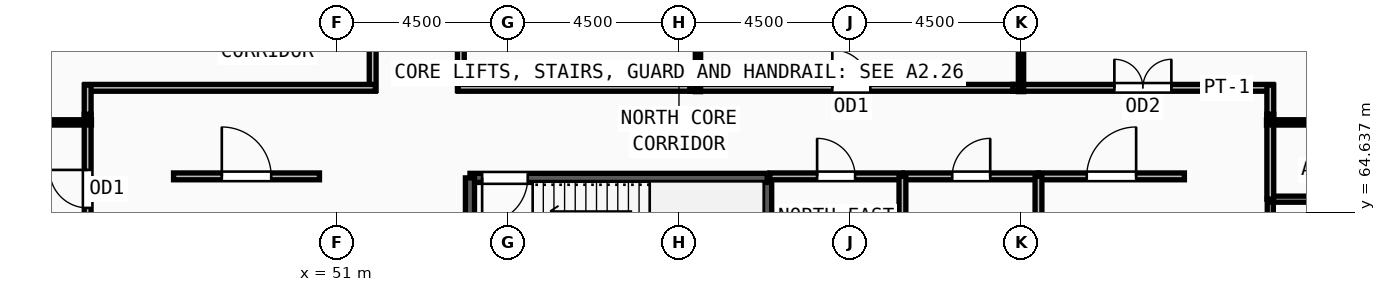
"""IFC4 building model, lengths in metres.
Left out: names, types, materials, properties, quantities, classifications, styles, units other than length and angle.
Written with IfcOpenShell. Run it as: python <this file> out.ifc"""

import sys

from ifc_helpers import new_model, si_unit, direction, frame, frame_2d, origin, place, context, subcontext, project, spatial, rectangle, extrude, source, transform, mapped, element, fill, save


model = new_model("IFC4")
c1 = context("Model", 3, precision=1e-05, world=origin(), true_north=direction((0.0, 1.0)))
c2 = subcontext(c1, "Body", "Model", "MODEL_VIEW")
j1 = project(units=[si_unit("LENGTHUNIT", "METRE"), si_unit("PLANEANGLEUNIT", "RADIAN")], contexts=[c1])
p1 = place(None, origin())
s1 = spatial("IfcSite", under=j1, at=p1, CompositionType="ELEMENT")
p2 = place(p1, origin())
s2 = spatial("IfcBuilding", under=s1, at=p2, CompositionType="ELEMENT")
p3 = place(p2, frame((0.0, 0.0, 297.75)))
s3 = spatial("IfcBuildingStorey", under=s2, at=p3, CompositionType="ELEMENT", Elevation=297.75)
p4 = place(p3, frame((62.32, 62.1, 0.0), z_axis=(0.0, 0.0, 1.0), x_axis=(0.0, 1.0, 0.0)))
e1 = element("IfcWall", 1, at=p4, inside=s3, PredefinedType="SOLIDWALL", context=c2, shape_type="SweptSolid", body=[
    extrude(rectangle(XDim=3.44, YDim=0.24, at=frame_2d((1.72, 0.0))), origin(), (0.0, 0.0, 1.0), 3.57),
])
p5 = place(p3, frame((62.32, 65.54, 0.0), z_axis=(0.0, 0.0, 1.0), x_axis=(-1.0, 0.0, 0.0)))
e2 = element("IfcWall", 2, at=p5, inside=s3, PredefinedType="SOLIDWALL", context=c2, shape_type="SweptSolid", body=[
    extrude(rectangle(XDim=7.82, YDim=0.24, at=frame_2d((3.91, 0.0))), origin(), (0.0, 0.0, 1.0), 3.57),
])
m1 = source(origin(), c2, "Body", "SweptSolid", [
    extrude(rectangle(XDim=1.2, YDim=2.2, at=frame_2d((0.6, 1.1))), frame((0.0, 0.13, 0.0), z_axis=(0.0, -1.0, 0.0), x_axis=(1.0, 0.0, 0.0)), (0.0, 0.0, 1.0), 0.26),
])
p6 = place(p5, frame((6.3, 0.0, 0.0)))
e3 = element("IfcOpeningElement", 3, at=p6, cuts=e2, PredefinedType="OPENING", context=c2, shape_type="MappedRepresentation", body=[
    mapped(m1, transform((0.0, 0.0, 0.0), x_axis=(1.0, 0.0, 0.0), y_axis=(0.0, 1.0, 0.0), z_axis=(0.0, 0.0, 1.0), scale=1.0)),
])
p7 = place(p3, frame((54.5, 65.54, 0.0), z_axis=(0.0, 0.0, 1.0), x_axis=(0.0, -1.0, 0.0)))
e4 = element("IfcWall", 4, at=p7, inside=s3, PredefinedType="SOLIDWALL", context=c2, shape_type="SweptSolid", body=[
    extrude(rectangle(XDim=3.44, YDim=0.24, at=frame_2d((1.72, 0.0))), origin(), (0.0, 0.0, 1.0), 3.57),
])
p8 = place(p3, frame((75.56, 62.24, 0.0), z_axis=(0.0, 0.0, 1.0), x_axis=(0.0, 1.0, 0.0)))
e5 = element("IfcWall", 5, at=p8, inside=s3, PredefinedType="PARTITIONING", context=c2, shape_type="SweptSolid", body=[
    extrude(rectangle(XDim=2.74, YDim=0.16, at=frame_2d((1.37, 0.0))), origin(), (0.0, 0.0, 1.0), 3.57),
])
m2 = source(origin(), c2, "Body", "SweptSolid", [
    extrude(rectangle(XDim=1.05, YDim=2.15, at=frame_2d((0.525, 1.075))), frame((0.0, 0.09, 0.0), z_axis=(0.0, -1.0, 0.0), x_axis=(1.0, 0.0, 0.0)), (0.0, 0.0, 1.0), 0.18),
])
p9 = place(p8, frame((0.845, 0.0, 0.0)))
e6 = element("IfcOpeningElement", 6, at=p9, cuts=e5, PredefinedType="OPENING", context=c2, shape_type="MappedRepresentation", body=[
    mapped(m2, transform((0.0, 0.0, 0.0), x_axis=(1.0, 0.0, 0.0), y_axis=(0.0, 1.0, 0.0), z_axis=(0.0, 0.0, 1.0), scale=1.0)),
])
p10 = place(p3, frame((62.39, 65.58, 0.0), z_axis=(0.0, 0.0, 1.0), x_axis=(1.0, 0.0, 0.0)))
e7 = element("IfcWall", 7, at=p10, inside=s3, PredefinedType="PARTITIONING", context=c2, shape_type="SweptSolid", body=[
    extrude(rectangle(XDim=3.49, YDim=0.18, at=frame_2d((1.745, 0.0))), origin(), (0.0, 0.0, 1.0), 3.57),
])
m3 = source(origin(), c2, "Body", "SweptSolid", [
    extrude(rectangle(XDim=1.0, YDim=2.2, at=frame_2d((0.5, 1.1))), frame((0.0, 0.1, 0.0), z_axis=(0.0, -1.0, 0.0), x_axis=(1.0, 0.0, 0.0)), (0.0, 0.0, 1.0), 0.2),
])
p11 = place(p10, frame((1.245, 0.0, 0.0)))
e8 = element("IfcOpeningElement", 8, at=p11, cuts=e7, PredefinedType="OPENING", context=c2, shape_type="MappedRepresentation", body=[
    mapped(m3, transform((0.0, 0.0, 0.0), x_axis=(1.0, 0.0, 0.0), y_axis=(0.0, 1.0, 0.0), z_axis=(0.0, 0.0, 1.0), scale=1.0)),
])
p12 = place(p3, frame((65.92, 65.58, 0.0), z_axis=(0.0, 0.0, 1.0), x_axis=(1.0, 0.0, 0.0)))
e9 = element("IfcWall", 9, at=p12, inside=s3, PredefinedType="PARTITIONING", context=c2, shape_type="SweptSolid", body=[
    extrude(rectangle(XDim=3.54, YDim=0.18, at=frame_2d((1.77, 0.0))), origin(), (0.0, 0.0, 1.0), 3.57),
])
p13 = place(p12, frame((1.27, 0.0, 0.0)))
e10 = element("IfcOpeningElement", 10, at=p13, cuts=e9, PredefinedType="OPENING", context=c2, shape_type="MappedRepresentation", body=[
    mapped(m3, transform((0.0, 0.0, 0.0), x_axis=(1.0, 0.0, 0.0), y_axis=(0.0, 1.0, 0.0), z_axis=(0.0, 0.0, 1.0), scale=1.0)),
])
p14 = place(p3, frame((46.7, 65.58, 0.0), z_axis=(0.0, 0.0, 1.0), x_axis=(1.0, 0.0, 0.0)))
e11 = element("IfcWall", 11, at=p14, inside=s3, PredefinedType="PARTITIONING", context=c2, shape_type="SweptSolid", body=[
    extrude(rectangle(XDim=3.84, YDim=0.18, at=frame_2d((1.92, 0.0))), origin(), (0.0, 0.0, 1.0), 3.57),
])
m4 = source(origin(), c2, "Body", "SweptSolid", [
    extrude(rectangle(XDim=1.3, YDim=2.2, at=frame_2d((0.65, 1.1))), frame((0.0, 0.1, 0.0), z_axis=(0.0, -1.0, 0.0), x_axis=(1.0, 0.0, 0.0)), (0.0, 0.0, 1.0), 0.2),
])
p15 = place(p14, frame((1.27, 0.0, 0.0)))
e12 = element("IfcOpeningElement", 12, at=p15, cuts=e11, PredefinedType="OPENING", context=c2, shape_type="MappedRepresentation", body=[
    mapped(m4, transform((0.0, 0.0, 0.0), x_axis=(1.0, 0.0, 0.0), y_axis=(0.0, 1.0, 0.0), z_axis=(0.0, 0.0, 1.0), scale=1.0)),
])
p16 = place(p3, frame((69.46, 65.58, 0.0), z_axis=(0.0, 0.0, 1.0), x_axis=(1.0, 0.0, 0.0)))
e13 = element("IfcWall", 13, at=p16, inside=s3, PredefinedType="PARTITIONING", context=c2, shape_type="SweptSolid", body=[
    extrude(rectangle(XDim=3.84, YDim=0.18, at=frame_2d((1.92, 0.0))), origin(), (0.0, 0.0, 1.0), 3.57),
])
p17 = place(p16, frame((1.27, 0.0, 0.0)))
e14 = element("IfcOpeningElement", 14, at=p17, cuts=e13, PredefinedType="OPENING", context=c2, shape_type="MappedRepresentation", body=[
    mapped(m4, transform((0.0, 0.0, 0.0), x_axis=(1.0, 0.0, 0.0), y_axis=(0.0, 1.0, 0.0), z_axis=(0.0, 0.0, 1.0), scale=1.0)),
])
p18 = place(p3, frame((68.785, 67.91, 0.0), z_axis=(0.0, 0.0, 1.0), x_axis=(1.0, 0.0, 0.0)))
e15 = element("IfcWall", 15, at=p18, inside=s3, PredefinedType="PARTITIONING", context=c2, shape_type="SweptSolid", body=[
    extrude(rectangle(XDim=6.845, YDim=0.18, at=frame_2d((3.422, 0.0))), origin(), (0.0, 0.0, 1.0), 3.57),
])
m5 = source(origin(), c2, "Body", "SweptSolid", [
    extrude(rectangle(XDim=1.5, YDim=2.2, at=frame_2d((0.75, 1.1))), frame((0.0, 0.1, 0.0), z_axis=(0.0, -1.0, 0.0), x_axis=(1.0, 0.0, 0.0)), (0.0, 0.0, 1.0), 0.2),
])
p19 = place(p18, frame((2.672, 0.0, 0.0)))
e16 = element("IfcOpeningElement", 16, at=p19, cuts=e15, PredefinedType="OPENING", context=c2, shape_type="MappedRepresentation", body=[
    mapped(m5, transform((0.0, 0.0, 0.0), x_axis=(1.0, 0.0, 0.0), y_axis=(0.0, 1.0, 0.0), z_axis=(0.0, 0.0, 1.0), scale=1.0)),
])
p20 = place(p3, frame((60.285, 67.91, 0.0), z_axis=(0.0, 0.0, 1.0), x_axis=(1.0, 0.0, 0.0)))
e17 = element("IfcWall", 17, at=p20, inside=s3, PredefinedType="PARTITIONING", context=c2, shape_type="SweptSolid", body=[
    extrude(rectangle(XDim=8.5, YDim=0.18, at=frame_2d((4.25, 0.0))), origin(), (0.0, 0.0, 1.0), 3.261),
])
p21 = place(p20, frame((3.75, 0.0, 0.0)))
e18 = element("IfcOpeningElement", 18, at=p21, cuts=e17, PredefinedType="OPENING", context=c2, shape_type="MappedRepresentation", body=[
    mapped(m3, transform((0.0, 0.0, 0.0), x_axis=(1.0, 0.0, 0.0), y_axis=(0.0, 1.0, 0.0), z_axis=(0.0, 0.0, 1.0), scale=1.0)),
])
p22 = place(p3, frame((54.26, 76.207, 0.0), z_axis=(0.0, 0.0, 1.0), x_axis=(0.0, -1.0, 0.0)))
e19 = element("IfcWall", 19, at=p22, inside=s3, PredefinedType="PARTITIONING", context=c2, shape_type="SweptSolid", body=[
    extrude(rectangle(XDim=8.367, YDim=0.18, at=frame_2d((4.184, 0.0))), origin(), (0.0, 0.0, 1.0), 3.57),
])
p23 = place(p22, frame((3.683, 0.0, 0.0)))
e20 = element("IfcOpeningElement", 20, at=p23, cuts=e19, PredefinedType="OPENING", context=c2, shape_type="MappedRepresentation", body=[
    mapped(m3, transform((0.0, 0.0, 0.0), x_axis=(1.0, 0.0, 0.0), y_axis=(0.0, 1.0, 0.0), z_axis=(0.0, 0.0, 1.0), scale=1.0)),
])
p24 = place(p3, frame((51.94, 67.84, 0.0), z_axis=(0.0, 0.0, 1.0), x_axis=(0.0, 1.0, 0.0)))
e21 = element("IfcWall", 21, at=p24, inside=s3, PredefinedType="PARTITIONING", context=c2, shape_type="SweptSolid", body=[
    extrude(rectangle(XDim=8.212, YDim=0.18, at=frame_2d((4.106, 0.0))), origin(), (0.0, 0.0, 1.0), 3.57),
])
p25 = place(p24, frame((3.356, 0.0, 0.0)))
e22 = element("IfcOpeningElement", 22, at=p25, cuts=e21, PredefinedType="OPENING", context=c2, shape_type="MappedRepresentation", body=[
    mapped(m5, transform((0.0, 0.0, 0.0), x_axis=(1.0, 0.0, 0.0), y_axis=(0.0, 1.0, 0.0), z_axis=(0.0, 0.0, 1.0), scale=1.0)),
])
p26 = place(p3, frame((44.44, 63.285, 0.0), z_axis=(0.0, 0.0, 1.0), x_axis=(0.0, 1.0, 0.0)))
e23 = element("IfcWall", 23, at=p26, inside=s3, PredefinedType="PARTITIONING", context=c2, shape_type="SweptSolid", body=[
    extrude(rectangle(XDim=3.93, YDim=0.18, at=frame_2d((1.965, 0.0))), origin(), (0.0, 0.0, 1.0), 3.57),
])
p27 = place(p26, frame((1.465, 0.0, 0.0)))
e24 = element("IfcOpeningElement", 24, at=p27, cuts=e23, PredefinedType="OPENING", context=c2, shape_type="MappedRepresentation", body=[
    mapped(m3, transform((0.0, 0.0, 0.0), x_axis=(1.0, 0.0, 0.0), y_axis=(0.0, 1.0, 0.0), z_axis=(0.0, 0.0, 1.0), scale=1.0)),
])
p28 = place(p3, frame((75.56, 64.98, 0.0), z_axis=(0.0, 0.0, 1.0), x_axis=(1.0, 0.0, 0.0)))
e25 = element("IfcWall", 25, at=p28, inside=s3, PredefinedType="PARTITIONING", context=c2, shape_type="SweptSolid", body=[
    extrude(rectangle(XDim=4.46, YDim=0.16, at=frame_2d((2.23, 0.0))), origin(), (0.0, 0.0, 1.0), 3.57),
])
p29 = place(p3, frame((65.88, 61.775, 0.0), z_axis=(0.0, 0.0, 1.0), x_axis=(0.0, 1.0, 0.0)))
e26 = element("IfcWall", 26, at=p29, inside=s3, PredefinedType="PARTITIONING", context=c2, shape_type="SweptSolid", body=[
    extrude(rectangle(XDim=3.805, YDim=0.18, at=frame_2d((1.903, 0.0))), origin(), (0.0, 0.0, 1.0), 3.57),
])
p30 = place(p3, frame((69.46, 61.95, 0.0), z_axis=(0.0, 0.0, 1.0), x_axis=(0.0, 1.0, 0.0)))
e27 = element("IfcWall", 27, at=p30, inside=s3, PredefinedType="PARTITIONING", context=c2, shape_type="SweptSolid", body=[
    extrude(rectangle(XDim=3.63, YDim=0.18, at=frame_2d((1.815, 0.0))), origin(), (0.0, 0.0, 1.0), 3.57),
])
p31 = place(p3, frame((75.56, 67.215, 0.0), z_axis=(0.0, 0.0, 1.0), x_axis=(0.0, -1.0, 0.0)))
e28 = element("IfcWall", 28, at=p31, inside=s3, PredefinedType="PARTITIONING", context=c2, shape_type="SweptSolid", body=[
    extrude(rectangle(XDim=2.235, YDim=0.18, at=frame_2d((1.118, 0.0))), origin(), (0.0, 0.0, 1.0), 3.57),
])
p32 = place(p3, frame((75.56, 67.98, 0.0), z_axis=(0.0, 0.0, 1.0), x_axis=(0.0, -1.0, 0.0)))
e29 = element("IfcWall", 29, at=p32, inside=s3, PredefinedType="PARTITIONING", context=c2, shape_type="SweptSolid", body=[
    extrude(rectangle(XDim=0.765, YDim=0.18, at=frame_2d((0.382, 0.0))), origin(), (0.0, 0.0, 1.0), 3.57),
])
p33 = place(p3, frame((54.19, 67.91, 0.0), z_axis=(0.0, 0.0, 1.0), x_axis=(1.0, 0.0, 0.0)))
e30 = element("IfcWall", 30, at=p33, inside=s3, PredefinedType="PARTITIONING", context=c2, shape_type="SweptSolid", body=[
    extrude(rectangle(XDim=6.095, YDim=0.18, at=frame_2d((3.047, 0.0))), origin(), (0.0, 0.0, 1.0), 3.57),
])
p34 = place(p3, frame((44.37, 67.91, 0.0), z_axis=(0.0, 0.0, 1.0), x_axis=(1.0, 0.0, 0.0)))
e31 = element("IfcWall", 31, at=p34, inside=s3, PredefinedType="PARTITIONING", context=c2, shape_type="SweptSolid", body=[
    extrude(rectangle(XDim=7.64, YDim=0.18, at=frame_2d((3.82, 0.0))), origin(), (0.0, 0.0, 1.0), 3.57),
])
p35 = place(p3, frame((44.44, 67.215, 0.0), z_axis=(0.0, 0.0, 1.0), x_axis=(0.0, 1.0, 0.0)))
e32 = element("IfcWall", 32, at=p35, inside=s3, PredefinedType="PARTITIONING", context=c2, shape_type="SweptSolid", body=[
    extrude(rectangle(XDim=0.765, YDim=0.18, at=frame_2d((0.382, 0.0))), origin(), (0.0, 0.0, 1.0), 3.57),
])
for number, where, z_axis, x_axis in (
    (33, (44.54, 67.0, 0.0), (0.0, 0.0, 1.0), (-1.0, 0.0, 0.0)),
    (34, (75.46, 67.0, 0.0), (0.0, 0.0, 1.0), (1.0, 0.0, 0.0)),
):
    element("IfcWall", number, at=place(p3, frame(where, z_axis=z_axis, x_axis=x_axis)), inside=s3, PredefinedType="PARTITIONING", context=c2, shape_type="SweptSolid", body=[
        extrude(rectangle(XDim=14.581, YDim=0.14, at=frame_2d((7.291, 0.0))), origin(), (0.0, 0.0, 1.0), 3.57),
    ])
p36 = place(p3, frame((60.5, 67.81, 0.0), z_axis=(0.0, 0.0, 1.0), x_axis=(0.0, 1.0, 0.0)))
e35 = element("IfcWall", 35, at=p36, inside=s3, PredefinedType="PARTITIONING", context=c2, shape_type="SweptSolid", body=[
    extrude(rectangle(XDim=8.904, YDim=0.14, at=frame_2d((4.452, 0.0))), origin(), (0.0, 0.0, 1.0), 3.57),
])
p37 = place(p3, frame((69.0, 67.81, 0.0), z_axis=(0.0, 0.0, 1.0), x_axis=(0.0, 1.0, 0.0)))
e36 = element("IfcWall", 36, at=p37, inside=s3, PredefinedType="PARTITIONING", context=c2, shape_type="SweptSolid", body=[
    extrude(rectangle(XDim=8.494, YDim=0.14, at=frame_2d((4.247, 0.0))), origin(), (0.0, 0.0, 1.0), 3.57),
])
m6 = source(origin(), c2, "Body", "SweptSolid", [
    extrude(rectangle(XDim=1.2, YDim=2.2, at=frame_2d((0.6, 1.1))), frame((0.0, 0.025, 0.0), z_axis=(0.0, -1.0, 0.0), x_axis=(1.0, 0.0, 0.0)), (0.0, 0.0, 1.0), 0.05),
])
p38 = place(p6, origin())
e37 = element("IfcDoor", 37, at=p38, inside=s3, OperationType="SINGLE_SWING_RIGHT", PredefinedType="DOOR", context=c2, shape_type="MappedRepresentation", body=[
    mapped(m6, transform((0.0, 0.0, 0.0), x_axis=(1.0, 0.0, 0.0), y_axis=(0.0, 1.0, 0.0), z_axis=(0.0, 0.0, 1.0), scale=1.0)),
])
fill(e3, e37)
m7 = source(origin(), c2, "Body", "SweptSolid", [
    extrude(rectangle(XDim=1.0, YDim=2.2, at=frame_2d((0.5, 1.1))), frame((0.0, 0.025, 0.0), z_axis=(0.0, -1.0, 0.0), x_axis=(1.0, 0.0, 0.0)), (0.0, 0.0, 1.0), 0.05),
])
p39 = place(p11, origin())
e38 = element("IfcDoor", 38, at=p39, inside=s3, OperationType="SINGLE_SWING_LEFT", PredefinedType="DOOR", context=c2, shape_type="MappedRepresentation", body=[
    mapped(m7, transform((0.0, 0.0, 0.0), x_axis=(1.0, 0.0, 0.0), y_axis=(0.0, 1.0, 0.0), z_axis=(0.0, 0.0, 1.0), scale=1.0)),
])
fill(e8, e38)
p40 = place(p13, origin())
e39 = element("IfcDoor", 39, at=p40, inside=s3, OperationType="SINGLE_SWING_RIGHT", PredefinedType="DOOR", context=c2, shape_type="MappedRepresentation", body=[
    mapped(m7, transform((0.0, 0.0, 0.0), x_axis=(1.0, 0.0, 0.0), y_axis=(0.0, 1.0, 0.0), z_axis=(0.0, 0.0, 1.0), scale=1.0)),
])
fill(e10, e39)
m8 = source(origin(), c2, "Body", "SweptSolid", [
    extrude(rectangle(XDim=1.3, YDim=2.2, at=frame_2d((0.65, 1.1))), frame((0.0, 0.025, 0.0), z_axis=(0.0, -1.0, 0.0), x_axis=(1.0, 0.0, 0.0)), (0.0, 0.0, 1.0), 0.05),
])
p41 = place(p15, origin())
e40 = element("IfcDoor", 40, at=p41, inside=s3, OperationType="SINGLE_SWING_LEFT", PredefinedType="DOOR", context=c2, shape_type="MappedRepresentation", body=[
    mapped(m8, transform((0.0, 0.0, 0.0), x_axis=(1.0, 0.0, 0.0), y_axis=(0.0, 1.0, 0.0), z_axis=(0.0, 0.0, 1.0), scale=1.0)),
])
fill(e12, e40)
p42 = place(p17, origin())
e41 = element("IfcDoor", 41, at=p42, inside=s3, OperationType="SINGLE_SWING_RIGHT", PredefinedType="DOOR", context=c2, shape_type="MappedRepresentation", body=[
    mapped(m8, transform((0.0, 0.0, 0.0), x_axis=(1.0, 0.0, 0.0), y_axis=(0.0, 1.0, 0.0), z_axis=(0.0, 0.0, 1.0), scale=1.0)),
])
fill(e14, e41)
m9 = source(origin(), c2, "Body", "SweptSolid", [
    extrude(rectangle(XDim=1.5, YDim=2.2, at=frame_2d((0.75, 1.1))), frame((0.0, 0.025, 0.0), z_axis=(0.0, -1.0, 0.0), x_axis=(1.0, 0.0, 0.0)), (0.0, 0.0, 1.0), 0.05),
])
p43 = place(p19, origin())
e42 = element("IfcDoor", 42, at=p43, inside=s3, OperationType="DOUBLE_DOOR_SINGLE_SWING", PredefinedType="DOOR", context=c2, shape_type="MappedRepresentation", body=[
    mapped(m9, transform((0.0, 0.0, 0.0), x_axis=(1.0, 0.0, 0.0), y_axis=(0.0, 1.0, 0.0), z_axis=(0.0, 0.0, 1.0), scale=1.0)),
])
fill(e16, e42)
p44 = place(p21, origin())
e43 = element("IfcDoor", 43, at=p44, inside=s3, OperationType="SINGLE_SWING_LEFT", PredefinedType="DOOR", context=c2, shape_type="MappedRepresentation", body=[
    mapped(m7, transform((0.0, 0.0, 0.0), x_axis=(1.0, 0.0, 0.0), y_axis=(0.0, 1.0, 0.0), z_axis=(0.0, 0.0, 1.0), scale=1.0)),
])
fill(e18, e43)
p45 = place(p27, origin())
e44 = element("IfcDoor", 44, at=p45, inside=s3, OperationType="SINGLE_SWING_RIGHT", PredefinedType="DOOR", context=c2, shape_type="MappedRepresentation", body=[
    mapped(m7, transform((0.0, 0.0, 0.0), x_axis=(1.0, 0.0, 0.0), y_axis=(0.0, 1.0, 0.0), z_axis=(0.0, 0.0, 1.0), scale=1.0)),
])
fill(e24, e44)
save(model, sys.argv[1])
